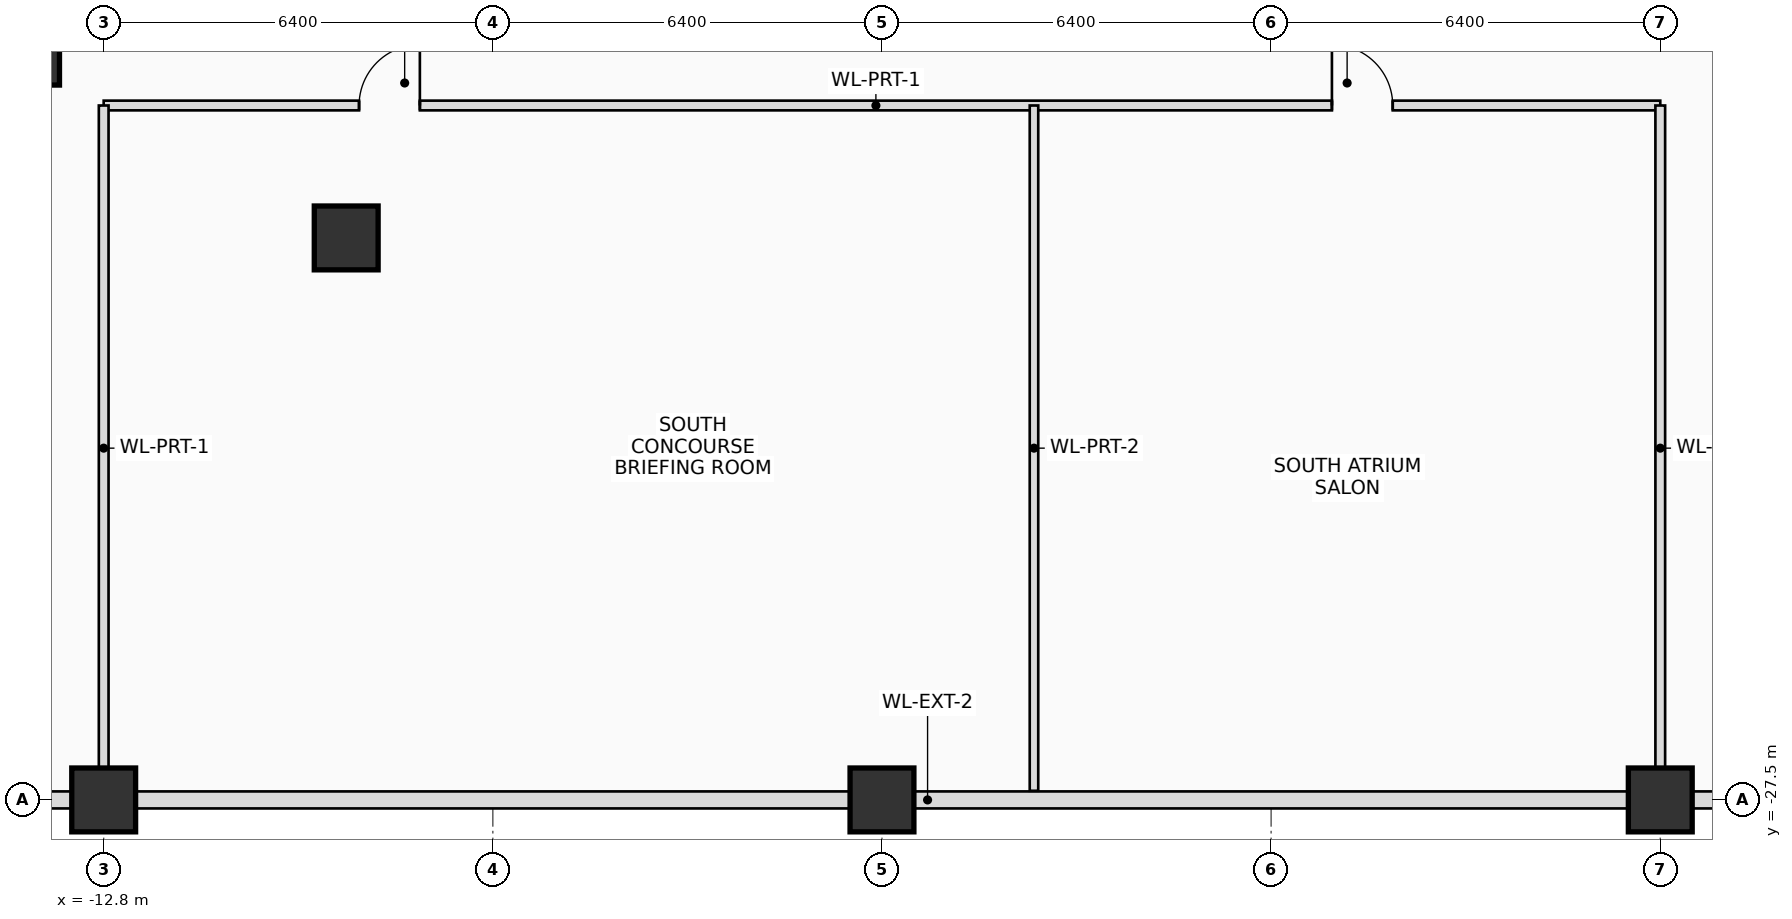
"""IFC4 building model, lengths in metres.
Left out: names, types, materials, properties, quantities, classifications, styles, units other than length and angle.
Written with IfcOpenShell. Run it as: python <this file> out.ifc"""

import sys

from ifc_helpers import new_model, si_unit, direction, frame, frame_2d, origin, origin_2d, place, context, subcontext, project, spatial, rectangle, extrude, source, transform, mapped, element, fill, save


model = new_model("IFC4")
c1 = context("Model", 3, precision=1e-05, world=origin(), true_north=direction((0.0, 1.0)))
c2 = subcontext(c1, "Body", "Model", "MODEL_VIEW")
j1 = project(units=[si_unit("LENGTHUNIT", "METRE"), si_unit("PLANEANGLEUNIT", "RADIAN")], contexts=[c1])
p1 = place(None, origin())
s1 = spatial("IfcSite", under=j1, at=p1, CompositionType="ELEMENT")
p2 = place(p1, origin())
s2 = spatial("IfcBuilding", under=s1, at=p2, CompositionType="ELEMENT")
p3 = place(p2, frame((0.0, 0.0, 8.4)))
s3 = spatial("IfcBuildingStorey", under=s2, at=p3, CompositionType="ELEMENT", Elevation=8.4)
m1 = source(origin(), c2, "Body", "SweptSolid", [
    extrude(rectangle(XDim=1.05, YDim=1.05, at=origin_2d()), origin(), (0.0, 0.0, 1.0), 3.9),
])
for number, where, z_axis, x_axis in (
    (1, (-12.8, -27.5, 0.0), (0.0, 0.0, 1.0), (1.0, 0.0, 0.0)),
    (2, (0.0, -27.5, 0.0), (0.0, 0.0, 1.0), (1.0, 0.0, 0.0)),
    (3, (12.8, -27.5, 0.0), (0.0, 0.0, 1.0), (1.0, 0.0, 0.0)),
    (4, (-8.812, -18.258, 0.0), (0.0, 0.0, 1.0), (1.0, 0.0, 0.0)),
    (5, (-14.052, -15.219, 0.0), (0.0, 0.0, 1.0), (1.0, 0.0, 0.0)),
):
    element("IfcColumn", number, at=place(p3, frame(where, z_axis=z_axis, x_axis=x_axis)), inside=s3, PredefinedType="COLUMN", context=c2, shape_type="MappedRepresentation", body=[
        mapped(m1, transform((0.0, 0.0, 0.0), scale=1.0)),
    ])
p4 = place(p3, frame((34.0, -27.5, 0.0), z_axis=(0.0, 0.0, 1.0), x_axis=(-1.0, 0.0, 0.0)))
e6 = element("IfcWall", 6, at=p4, inside=s3, PredefinedType="SOLIDWALL", context=c2, shape_type="SweptSolid", body=[
    extrude(rectangle(XDim=68.0, YDim=0.28, at=frame_2d((34.0, 0.0))), origin(), (0.0, 0.0, 1.0), 2.65),
])
p5 = place(p4, frame((16.0, 0.0, 0.65)))
e7 = element("IfcOpeningElement", 7, at=p5, cuts=e6, PredefinedType="OPENING", context=c2, shape_type="SweptSolid", body=[
    extrude(rectangle(XDim=1.5, YDim=1.8, at=frame_2d((0.75, 0.9))), frame((0.0, 0.15, 0.0), z_axis=(0.0, -1.0, 0.0), x_axis=(1.0, 0.0, 0.0)), (0.0, 0.0, 1.0), 0.3),
])
p6 = place(p4, frame((49.0, 0.0, 0.65)))
e8 = element("IfcOpeningElement", 8, at=p6, cuts=e6, PredefinedType="OPENING", context=c2, shape_type="SweptSolid", body=[
    extrude(rectangle(XDim=1.5, YDim=1.8, at=frame_2d((0.75, 0.9))), frame((0.0, 0.15, 0.0), z_axis=(0.0, -1.0, 0.0), x_axis=(1.0, 0.0, 0.0)), (0.0, 0.0, 1.0), 0.3),
])
p7 = place(p3, frame((-12.8, -16.08, 0.0), z_axis=(0.0, 0.0, 1.0), x_axis=(1.0, 0.0, 0.0)))
e9 = element("IfcWall", 9, at=p7, inside=s3, PredefinedType="PARTITIONING", context=c2, shape_type="SweptSolid", body=[
    extrude(rectangle(XDim=25.6, YDim=0.16, at=frame_2d((12.8, 0.0))), origin(), (0.0, 0.0, 1.0), 3.025),
])
p8 = place(p7, frame((4.2, 0.0, 0.0)))
e10 = element("IfcOpeningElement", 10, at=p8, cuts=e9, PredefinedType="OPENING", context=c2, shape_type="SweptSolid", body=[
    extrude(rectangle(XDim=1.0, YDim=2.25, at=frame_2d((0.5, 1.125))), frame((0.0, 0.09, 0.0), z_axis=(0.0, -1.0, 0.0), x_axis=(1.0, 0.0, 0.0)), (0.0, 0.0, 1.0), 0.18),
])
p9 = place(p7, frame((20.2, 0.0, 0.0)))
e11 = element("IfcOpeningElement", 11, at=p9, cuts=e9, PredefinedType="OPENING", context=c2, shape_type="SweptSolid", body=[
    extrude(rectangle(XDim=1.0, YDim=2.25, at=frame_2d((0.5, 1.125))), frame((0.0, 0.09, 0.0), z_axis=(0.0, -1.0, 0.0), x_axis=(1.0, 0.0, 0.0)), (0.0, 0.0, 1.0), 0.18),
])
for number, where, z_axis, x_axis in (
    (12, (-12.8, -27.35, 0.0), (0.0, 0.0, 1.0), (0.0, 1.0, 0.0)),
    (13, (12.8, -27.35, 0.0), (0.0, 0.0, 1.0), (0.0, 1.0, 0.0)),
):
    element("IfcWall", number, at=place(p3, frame(where, z_axis=z_axis, x_axis=x_axis)), inside=s3, PredefinedType="PARTITIONING", context=c2, shape_type="SweptSolid", body=[
        extrude(rectangle(XDim=11.27, YDim=0.16, at=frame_2d((5.635, 0.0))), origin(), (0.0, 0.0, 1.0), 3.025),
    ])
p10 = place(p3, frame((2.5, -27.35, 0.0), z_axis=(0.0, 0.0, 1.0), x_axis=(0.0, 1.0, 0.0)))
e14 = element("IfcWall", 14, at=p10, inside=s3, PredefinedType="PARTITIONING", context=c2, shape_type="SweptSolid", body=[
    extrude(rectangle(XDim=11.27, YDim=0.14, at=frame_2d((5.635, 0.0))), origin(), (0.0, 0.0, 1.0), 3.57),
])
p11 = place(p8, origin())
e15 = element("IfcDoor", 15, at=p11, inside=s3, OperationType="SINGLE_SWING_RIGHT", PredefinedType="DOOR", context=c2, shape_type="SweptSolid", body=[
    extrude(rectangle(XDim=1.0, YDim=2.25, at=frame_2d((0.5, 1.125))), frame((0.0, 0.025, 0.0), z_axis=(0.0, -1.0, 0.0), x_axis=(1.0, 0.0, 0.0)), (0.0, 0.0, 1.0), 0.05),
])
fill(e10, e15)
p12 = place(p9, origin())
e16 = element("IfcDoor", 16, at=p12, inside=s3, OperationType="SINGLE_SWING_LEFT", PredefinedType="DOOR", context=c2, shape_type="SweptSolid", body=[
    extrude(rectangle(XDim=1.0, YDim=2.25, at=frame_2d((0.5, 1.125))), frame((0.0, 0.025, 0.0), z_axis=(0.0, -1.0, 0.0), x_axis=(1.0, 0.0, 0.0)), (0.0, 0.0, 1.0), 0.05),
])
fill(e11, e16)
save(model, sys.argv[1])
